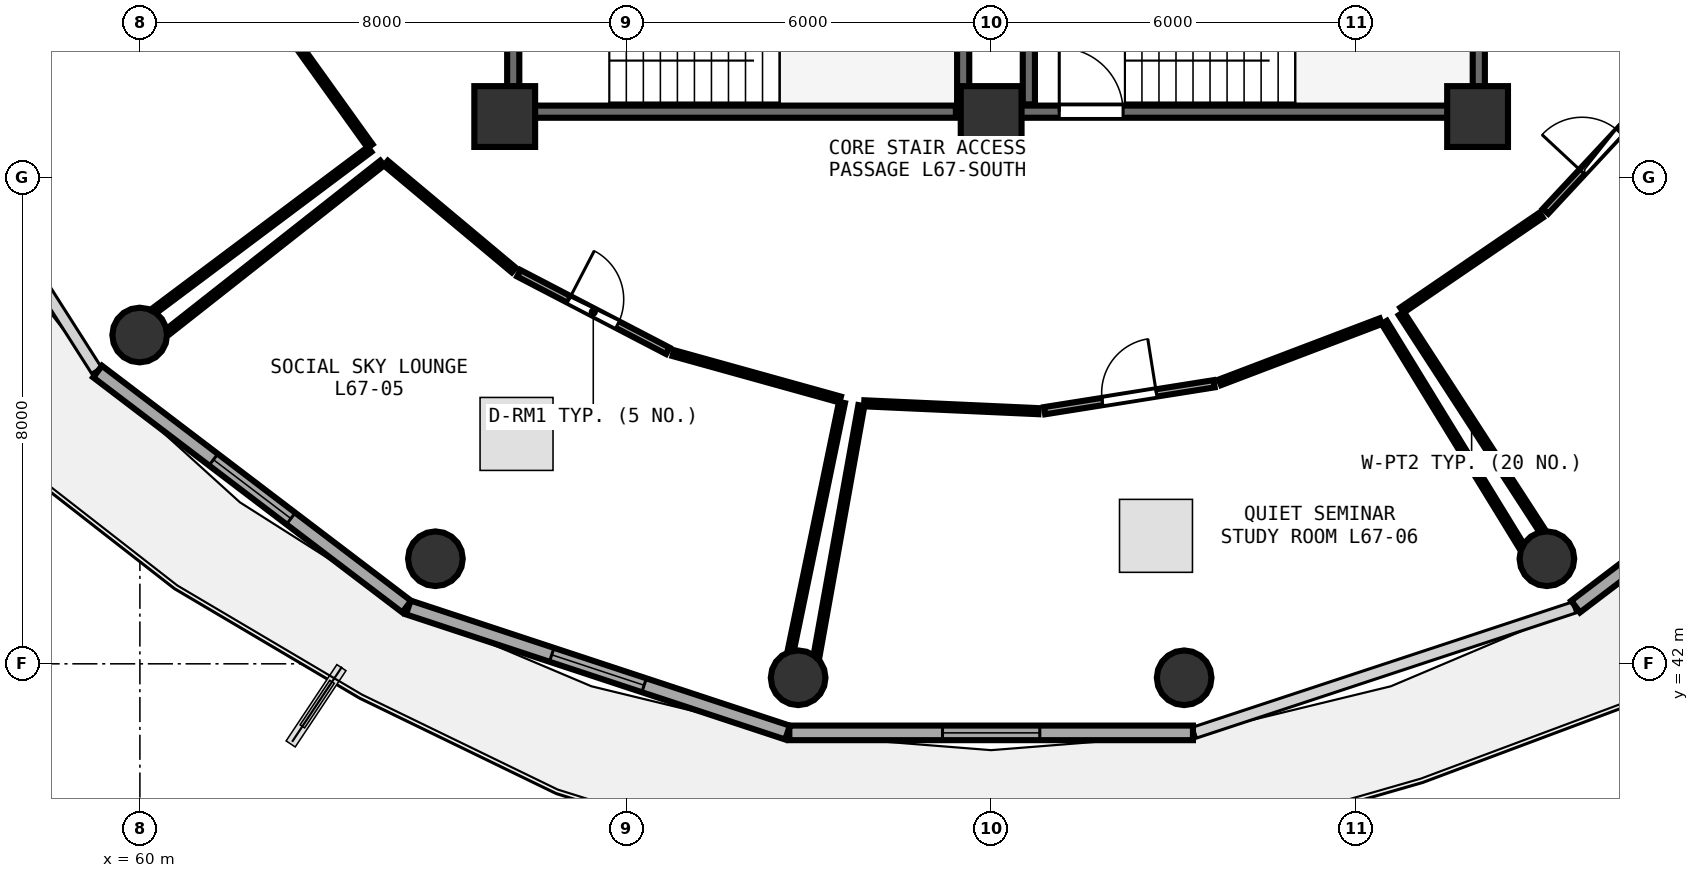
"""IFC4 building model, lengths in metres.
Left out: names, types, materials, properties, quantities, classifications, styles, units other than length and angle.
Written with IfcOpenShell. Run it as: python <this file> out.ifc"""

import sys

from ifc_helpers import new_model, si_unit, direction, frame, frame_2d, origin, origin_2d, place, context, subcontext, project, spatial, rectangle, circle, extrude, element, fill, save


model = new_model("IFC4")
c1 = context("Model", 3, precision=1e-05, world=origin(), true_north=direction((0.0, 1.0)))
c2 = subcontext(c1, "Body", "Model", "MODEL_VIEW")
j1 = project(units=[si_unit("LENGTHUNIT", "METRE"), si_unit("PLANEANGLEUNIT", "RADIAN")], contexts=[c1])
p1 = place(None, origin())
s1 = spatial("IfcSite", under=j1, at=p1, CompositionType="ELEMENT")
p2 = place(p1, origin())
s2 = spatial("IfcBuilding", under=s1, at=p2, CompositionType="ELEMENT")
p3 = place(p2, frame((0.0, 0.0, 263.7)))
s3 = spatial("IfcBuildingStorey", under=s2, at=p3, CompositionType="ELEMENT", Elevation=263.7)
for number, where, z_axis, x_axis in (
    (1, (66.0, 51.0, 0.0), (0.0, 0.0, 1.0), (1.0, 0.0, 0.0)),
    (2, (74.0, 51.0, 0.0), (0.0, 0.0, 1.0), (1.0, 0.0, 0.0)),
    (3, (82.0, 51.0, 0.0), (0.0, 0.0, 1.0), (1.0, 0.0, 0.0)),
):
    element("IfcColumn", number, at=place(p3, frame(where, z_axis=z_axis, x_axis=x_axis)), inside=s3, PredefinedType="PILASTER", context=c2, shape_type="SweptSolid", body=[
        extrude(rectangle(XDim=1.0, YDim=1.0, at=origin_2d()), origin(), (0.0, 0.0, 1.0), 3.75),
    ])
for number, where, z_axis, x_axis in (
    (4, (59.997, 47.407, 0.0), (0.0, 0.0, 1.0), (1.0, 0.0, 0.0)),
    (5, (64.86, 43.728, 0.0), (0.0, 0.0, 1.0), (1.0, 0.0, 0.0)),
    (6, (70.826, 41.771, 0.0), (0.0, 0.0, 1.0), (1.0, 0.0, 0.0)),
    (7, (77.174, 41.771, 0.0), (0.0, 0.0, 1.0), (1.0, 0.0, 0.0)),
    (8, (83.14, 43.728, 0.0), (0.0, 0.0, 1.0), (1.0, 0.0, 0.0)),
):
    element("IfcColumn", number, at=place(p3, frame(where, z_axis=z_axis, x_axis=x_axis)), inside=s3, PredefinedType="COLUMN", context=c2, shape_type="SweptSolid", body=[
        extrude(circle(Radius=0.45, at=origin_2d()), origin(), (0.0, 0.0, 1.0), 3.75),
    ])
p4 = place(p3, frame((59.304, 46.806, 0.0), z_axis=(0.0, 0.0, 1.0), x_axis=(0.796010444211, -0.605282886514, 0.0)))
e9 = element("IfcWall", 9, at=p4, inside=s3, PredefinedType="SOLIDWALL", context=c2, shape_type="SweptSolid", body=[
    extrude(rectangle(XDim=6.387, YDim=0.24, at=frame_2d((3.194, 0.0))), origin(), (0.0, 0.0, 1.0), 3.475),
])
p5 = place(p4, frame((2.394, 0.0, 0.85)))
e10 = element("IfcOpeningElement", 10, at=p5, cuts=e9, PredefinedType="OPENING", context=c2, shape_type="SweptSolid", body=[
    extrude(rectangle(XDim=1.6, YDim=1.45, at=frame_2d((0.8, 0.725))), frame((0.0, 0.13, 0.0), z_axis=(0.0, -1.0, 0.0), x_axis=(1.0, 0.0, 0.0)), (0.0, 0.0, 1.0), 0.26),
])
p6 = place(p3, frame((64.414, 42.927, 0.0), z_axis=(0.0, 0.0, 1.0), x_axis=(0.949663708393, -0.313271193954, 0.0)))
e11 = element("IfcWall", 11, at=p6, inside=s3, PredefinedType="SOLIDWALL", context=c2, shape_type="SweptSolid", body=[
    extrude(rectangle(XDim=6.568, YDim=0.24, at=frame_2d((3.284, 0.0))), origin(), (0.0, 0.0, 1.0), 3.475),
])
p7 = place(p6, frame((2.484, 0.0, 0.85)))
e12 = element("IfcOpeningElement", 12, at=p7, cuts=e11, PredefinedType="OPENING", context=c2, shape_type="SweptSolid", body=[
    extrude(rectangle(XDim=1.6, YDim=1.45, at=frame_2d((0.8, 0.725))), frame((0.0, 0.13, 0.0), z_axis=(0.0, -1.0, 0.0), x_axis=(1.0, 0.0, 0.0)), (0.0, 0.0, 1.0), 0.26),
])
p8 = place(p3, frame((70.681, 40.864, 0.0), z_axis=(0.0, 0.0, 1.0), x_axis=(1.0, 0.0, 0.0)))
e13 = element("IfcWall", 13, at=p8, inside=s3, PredefinedType="SOLIDWALL", context=c2, shape_type="SweptSolid", body=[
    extrude(rectangle(XDim=6.638, YDim=0.24, at=frame_2d((3.319, 0.0))), origin(), (0.0, 0.0, 1.0), 3.475),
])
p9 = place(p8, frame((2.519, 0.0, 0.85)))
e14 = element("IfcOpeningElement", 14, at=p9, cuts=e13, PredefinedType="OPENING", context=c2, shape_type="SweptSolid", body=[
    extrude(rectangle(XDim=1.6, YDim=1.45, at=frame_2d((0.8, 0.725))), frame((0.0, 0.13, 0.0), z_axis=(0.0, -1.0, 0.0), x_axis=(1.0, 0.0, 0.0)), (0.0, 0.0, 1.0), 0.26),
])
p10 = place(p3, frame((83.612, 42.94, 0.0), z_axis=(0.0, 0.0, 1.0), x_axis=(0.796010444211, 0.605282886514, 0.0)))
e15 = element("IfcWall", 15, at=p10, inside=s3, PredefinedType="SOLIDWALL", context=c2, shape_type="SweptSolid", body=[
    extrude(rectangle(XDim=6.387, YDim=0.24, at=frame_2d((3.194, 0.0))), origin(), (0.0, 0.0, 1.0), 3.475),
])
p11 = place(p10, frame((2.394, 0.0, 0.85)))
e16 = element("IfcOpeningElement", 16, at=p11, cuts=e15, PredefinedType="OPENING", context=c2, shape_type="SweptSolid", body=[
    extrude(rectangle(XDim=1.6, YDim=1.45, at=frame_2d((0.8, 0.725))), frame((0.0, 0.13, 0.0), z_axis=(0.0, -1.0, 0.0), x_axis=(1.0, 0.0, 0.0)), (0.0, 0.0, 1.0), 0.26),
])
p12 = place(p3, frame((74.0, 51.08, 0.0), z_axis=(0.0, 0.0, 1.0), x_axis=(1.0, 0.0, 0.0)))
e17 = element("IfcWall", 17, at=p12, inside=s3, PredefinedType="SHEAR", context=c2, shape_type="SweptSolid", body=[
    extrude(rectangle(XDim=7.9, YDim=0.2, at=frame_2d((3.95, 0.0))), origin(), (0.0, 0.0, 1.0), 3.49),
])
p13 = place(p12, frame((1.12, 0.0, 0.0)))
e18 = element("IfcOpeningElement", 18, at=p13, cuts=e17, PredefinedType="OPENING", context=c2, shape_type="SweptSolid", body=[
    extrude(rectangle(XDim=1.05, YDim=2.1, at=frame_2d((0.525, 1.05))), frame((0.0, 0.11, 0.0), z_axis=(0.0, -1.0, 0.0), x_axis=(1.0, 0.0, 0.0)), (0.0, 0.0, 1.0), 0.22),
])
for number, where, z_axis, x_axis in (
    (19, (82.02, 51.2, 0.0), (0.0, 0.0, 1.0), (0.0, 1.0, 0.0)),
    (20, (74.62, 54.27, 0.0), (0.0, 0.0, 1.0), (0.0, -1.0, 0.0)),
):
    element("IfcWall", number, at=place(p3, frame(where, z_axis=z_axis, x_axis=x_axis)), inside=s3, PredefinedType="SHEAR", context=c2, shape_type="SweptSolid", body=[
        extrude(rectangle(XDim=3.07, YDim=0.2, at=frame_2d((1.535, 0.0))), origin(), (0.0, 0.0, 1.0), 3.49),
    ])
p14 = place(p3, frame((66.26, 51.08, 0.0), z_axis=(0.0, 0.0, 1.0), x_axis=(1.0, 0.0, 0.0)))
e21 = element("IfcWall", 21, at=p14, inside=s3, PredefinedType="SHEAR", context=c2, shape_type="SweptSolid", body=[
    extrude(rectangle(XDim=7.16, YDim=0.2, at=frame_2d((3.58, 0.0))), origin(), (0.0, 0.0, 1.0), 3.49),
])
p15 = place(p3, frame((73.54, 51.2, 0.0), z_axis=(0.0, 0.0, 1.0), x_axis=(0.0, 1.0, 0.0)))
e22 = element("IfcWall", 22, at=p15, inside=s3, PredefinedType="SHEAR", context=c2, shape_type="SweptSolid", body=[
    extrude(rectangle(XDim=3.07, YDim=0.2, at=frame_2d((1.535, 0.0))), origin(), (0.0, 0.0, 1.0), 3.49),
])
p16 = place(p3, frame((66.14, 54.27, 0.0), z_axis=(0.0, 0.0, 1.0), x_axis=(0.0, -1.0, 0.0)))
e23 = element("IfcWall", 23, at=p16, inside=s3, PredefinedType="SHEAR", context=c2, shape_type="SweptSolid", body=[
    extrude(rectangle(XDim=3.07, YDim=0.2, at=frame_2d((1.535, 0.0))), origin(), (0.0, 0.0, 1.0), 3.49),
])
p17 = place(p16, frame((1.01, 0.0, 0.0)))
e24 = element("IfcOpeningElement", 24, at=p17, cuts=e23, PredefinedType="OPENING", context=c2, shape_type="SweptSolid", body=[
    extrude(rectangle(XDim=1.05, YDim=2.1, at=frame_2d((0.525, 1.05))), frame((0.0, 0.11, 0.0), z_axis=(0.0, -1.0, 0.0), x_axis=(1.0, 0.0, 0.0)), (0.0, 0.0, 1.0), 0.22),
])
p18 = place(p3, frame((66.232, 48.422, 0.0), z_axis=(0.0, 0.0, 1.0), x_axis=(0.887021247279, -0.461728607382, 0.0)))
e25 = element("IfcWall", 25, at=p18, inside=s3, PredefinedType="PARTITIONING", context=c2, shape_type="SweptSolid", body=[
    extrude(rectangle(XDim=2.761, YDim=0.12, at=frame_2d((1.38, 0.0))), origin(), (0.0, 0.0, 1.0), 3.235),
])
p19 = place(p18, frame((0.93, 0.0, 0.0)))
e26 = element("IfcOpeningElement", 26, at=p19, cuts=e25, PredefinedType="OPENING", context=c2, shape_type="SweptSolid", body=[
    extrude(rectangle(XDim=0.9, YDim=2.08, at=frame_2d((0.45, 1.04))), frame((0.0, 0.07, 0.0), z_axis=(0.0, -1.0, 0.0), x_axis=(1.0, 0.0, 0.0)), (0.0, 0.0, 1.0), 0.14),
])
p20 = place(p3, frame((74.878, 46.162, 0.0), z_axis=(0.0, 0.0, 1.0), x_axis=(0.987593415231, 0.157032627796, 0.0)))
e27 = element("IfcWall", 27, at=p20, inside=s3, PredefinedType="PARTITIONING", context=c2, shape_type="SweptSolid", body=[
    extrude(rectangle(XDim=2.823, YDim=0.12, at=frame_2d((1.412, 0.0))), origin(), (0.0, 0.0, 1.0), 3.075),
])
p21 = place(p20, frame((0.962, 0.0, 0.0)))
e28 = element("IfcOpeningElement", 28, at=p21, cuts=e27, PredefinedType="OPENING", context=c2, shape_type="SweptSolid", body=[
    extrude(rectangle(XDim=0.9, YDim=2.08, at=frame_2d((0.45, 1.04))), frame((0.0, 0.07, 0.0), z_axis=(0.0, -1.0, 0.0), x_axis=(1.0, 0.0, 0.0)), (0.0, 0.0, 1.0), 0.14),
])
p22 = place(p3, frame((83.118, 49.443, 0.0), z_axis=(0.0, 0.0, 1.0), x_axis=(0.681315269885, 0.731990097625, 0.0)))
e29 = element("IfcWall", 29, at=p22, inside=s3, PredefinedType="PARTITIONING", context=c2, shape_type="SweptSolid", body=[
    extrude(rectangle(XDim=2.664, YDim=0.12, at=frame_2d((1.332, 0.0))), origin(), (0.0, 0.0, 1.0), 3.075),
])
p23 = place(p22, frame((0.882, 0.0, 0.0)))
e30 = element("IfcOpeningElement", 30, at=p23, cuts=e29, PredefinedType="OPENING", context=c2, shape_type="SweptSolid", body=[
    extrude(rectangle(XDim=0.9, YDim=2.08, at=frame_2d((0.45, 1.04))), frame((0.0, 0.07, 0.0), z_axis=(0.0, -1.0, 0.0), x_axis=(1.0, 0.0, 0.0)), (0.0, 0.0, 1.0), 0.14),
])
p24 = place(p3, frame((62.23, 52.684, 0.0), z_axis=(0.0, 0.0, 1.0), x_axis=(0.582725386778, -0.812669135383, 0.0)))
e31 = element("IfcWall", 31, at=p24, inside=s3, PredefinedType="PARTITIONING", context=c2, shape_type="SweptSolid", body=[
    extrude(rectangle(XDim=2.669, YDim=0.1, at=frame_2d((1.334, 0.0))), origin(), (0.0, 0.0, 1.0), 3.075),
])
p25 = place(p3, frame((63.777, 50.458, 0.0), z_axis=(0.0, 0.0, 1.0), x_axis=(-0.800384816546, -0.599486568191, 0.0)))
e32 = element("IfcWall", 32, at=p25, inside=s3, PredefinedType="PARTITIONING", context=c2, shape_type="SweptSolid", body=[
    extrude(rectangle(XDim=4.414, YDim=0.1, at=frame_2d((2.207, 0.0))), origin(), (0.0, 0.0, 1.0), 3.175),
])
p26 = place(p3, frame((64.046, 50.234, 0.0), z_axis=(0.0, 0.0, 1.0), x_axis=(0.767022676895, -0.641619991216, 0.0)))
e33 = element("IfcWall", 33, at=p26, inside=s3, PredefinedType="PARTITIONING", context=c2, shape_type="SweptSolid", body=[
    extrude(rectangle(XDim=2.741, YDim=0.1, at=frame_2d((1.371, 0.0))), origin(), (0.0, 0.0, 1.0), 3.075),
])
p27 = place(p3, frame((68.772, 47.109, 0.0), z_axis=(0.0, 0.0, 1.0), x_axis=(0.963478601256, -0.267785333659, 0.0)))
e34 = element("IfcWall", 34, at=p27, inside=s3, PredefinedType="PARTITIONING", context=c2, shape_type="SweptSolid", body=[
    extrude(rectangle(XDim=2.848, YDim=0.1, at=frame_2d((1.424, 0.0))), origin(), (0.0, 0.0, 1.0), 3.48),
])
p28 = place(p3, frame((71.547, 46.297, 0.0), z_axis=(0.0, 0.0, 1.0), x_axis=(-0.202308141573, -0.979321916355, 0.0)))
e35 = element("IfcWall", 35, at=p28, inside=s3, PredefinedType="PARTITIONING", context=c2, shape_type="SweptSolid", body=[
    extrude(rectangle(XDim=4.153, YDim=0.1, at=frame_2d((2.076, 0.0))), origin(), (0.0, 0.0, 1.0), 3.175),
])
p29 = place(p3, frame((60.468, 47.468, 0.0), z_axis=(0.0, 0.0, 1.0), x_axis=(0.785736749878, 0.618561039745, 0.0)))
e36 = element("IfcWall", 36, at=p29, inside=s3, PredefinedType="PARTITIONING", context=c2, shape_type="SweptSolid", body=[
    extrude(rectangle(XDim=4.475, YDim=0.1, at=frame_2d((2.237, 0.0))), origin(), (0.0, 0.0, 1.0), 3.075),
])
p30 = place(p3, frame((71.912, 46.284, 0.0), z_axis=(0.0, 0.0, 1.0), x_axis=(0.998983047325, -0.045087372484, 0.0)))
e37 = element("IfcWall", 37, at=p30, inside=s3, PredefinedType="PARTITIONING", context=c2, shape_type="SweptSolid", body=[
    extrude(rectangle(XDim=2.87, YDim=0.1, at=frame_2d((1.435, 0.0))), origin(), (0.0, 0.0, 1.0), 3.075),
])
p31 = place(p3, frame((77.763, 46.629, 0.0), z_axis=(0.0, 0.0, 1.0), x_axis=(0.934691278896, 0.355460564839, 0.0)))
e38 = element("IfcWall", 38, at=p31, inside=s3, PredefinedType="PARTITIONING", context=c2, shape_type="SweptSolid", body=[
    extrude(rectangle(XDim=2.829, YDim=0.1, at=frame_2d((1.415, 0.0))), origin(), (0.0, 0.0, 1.0), 3.48),
])
p32 = place(p3, frame((80.466, 47.615, 0.0), z_axis=(0.0, 0.0, 1.0), x_axis=(0.522784059663, -0.852465147066, 0.0)))
e39 = element("IfcWall", 39, at=p32, inside=s3, PredefinedType="PARTITIONING", context=c2, shape_type="SweptSolid", body=[
    extrude(rectangle(XDim=4.306, YDim=0.1, at=frame_2d((2.153, 0.0))), origin(), (0.0, 0.0, 1.0), 3.175),
])
p33 = place(p3, frame((71.129, 42.136, 0.0), z_axis=(0.0, 0.0, 1.0), x_axis=(0.176199339585, 0.984354505618, 0.0)))
e40 = element("IfcWall", 40, at=p33, inside=s3, PredefinedType="PARTITIONING", context=c2, shape_type="SweptSolid", body=[
    extrude(rectangle(XDim=4.176, YDim=0.1, at=frame_2d((2.088, 0.0))), origin(), (0.0, 0.0, 1.0), 3.075),
])
p34 = place(p3, frame((80.757, 47.816, 0.0), z_axis=(0.0, 0.0, 1.0), x_axis=(0.826087380575, 0.563542047814, 0.0)))
e41 = element("IfcWall", 41, at=p34, inside=s3, PredefinedType="PARTITIONING", context=c2, shape_type="SweptSolid", body=[
    extrude(rectangle(XDim=2.768, YDim=0.1, at=frame_2d((1.384, 0.0))), origin(), (0.0, 0.0, 1.0), 3.075),
])
p35 = place(p3, frame((83.058, 44.196, 0.0), z_axis=(0.0, 0.0, 1.0), x_axis=(-0.544234825024, 0.838932926539, 0.0)))
e42 = element("IfcWall", 42, at=p35, inside=s3, PredefinedType="PARTITIONING", context=c2, shape_type="SweptSolid", body=[
    extrude(rectangle(XDim=4.249, YDim=0.1, at=frame_2d((2.125, 0.0))), origin(), (0.0, 0.0, 1.0), 3.075),
])
p36 = place(p5, origin())
e43 = element("IfcWindow", 43, at=p36, inside=s3, PartitioningType="SINGLE_PANEL", PredefinedType="WINDOW", context=c2, shape_type="SweptSolid", body=[
    extrude(rectangle(XDim=1.6, YDim=1.45, at=frame_2d((0.8, 0.725))), frame((0.0, 0.03, 0.0), z_axis=(0.0, -1.0, 0.0), x_axis=(1.0, 0.0, 0.0)), (0.0, 0.0, 1.0), 0.06),
])
fill(e10, e43)
p37 = place(p7, origin())
e44 = element("IfcWindow", 44, at=p37, inside=s3, PartitioningType="SINGLE_PANEL", PredefinedType="WINDOW", context=c2, shape_type="SweptSolid", body=[
    extrude(rectangle(XDim=1.6, YDim=1.45, at=frame_2d((0.8, 0.725))), frame((0.0, 0.03, 0.0), z_axis=(0.0, -1.0, 0.0), x_axis=(1.0, 0.0, 0.0)), (0.0, 0.0, 1.0), 0.06),
])
fill(e12, e44)
p38 = place(p9, origin())
e45 = element("IfcWindow", 45, at=p38, inside=s3, PartitioningType="SINGLE_PANEL", PredefinedType="WINDOW", context=c2, shape_type="SweptSolid", body=[
    extrude(rectangle(XDim=1.6, YDim=1.45, at=frame_2d((0.8, 0.725))), frame((0.0, 0.03, 0.0), z_axis=(0.0, -1.0, 0.0), x_axis=(1.0, 0.0, 0.0)), (0.0, 0.0, 1.0), 0.06),
])
fill(e14, e45)
p39 = place(p13, origin())
e46 = element("IfcDoor", 46, at=p39, inside=s3, OperationType="SINGLE_SWING_LEFT", PredefinedType="DOOR", context=c2, shape_type="SweptSolid", body=[
    extrude(rectangle(XDim=1.05, YDim=2.1, at=frame_2d((0.525, 1.05))), frame((0.0, 0.025, 0.0), z_axis=(0.0, -1.0, 0.0), x_axis=(1.0, 0.0, 0.0)), (0.0, 0.0, 1.0), 0.05),
])
fill(e18, e46)
p40 = place(p19, origin())
e47 = element("IfcDoor", 47, at=p40, inside=s3, OperationType="SINGLE_SWING_LEFT", PredefinedType="DOOR", context=c2, shape_type="SweptSolid", body=[
    extrude(rectangle(XDim=0.9, YDim=2.08, at=frame_2d((0.45, 1.04))), frame((0.0, 0.025, 0.0), z_axis=(0.0, -1.0, 0.0), x_axis=(1.0, 0.0, 0.0)), (0.0, 0.0, 1.0), 0.05),
])
fill(e26, e47)
p41 = place(p21, origin())
e48 = element("IfcDoor", 48, at=p41, inside=s3, OperationType="SINGLE_SWING_RIGHT", PredefinedType="DOOR", context=c2, shape_type="SweptSolid", body=[
    extrude(rectangle(XDim=0.9, YDim=2.08, at=frame_2d((0.45, 1.04))), frame((0.0, 0.025, 0.0), z_axis=(0.0, -1.0, 0.0), x_axis=(1.0, 0.0, 0.0)), (0.0, 0.0, 1.0), 0.05),
])
fill(e28, e48)
p42 = place(p23, origin())
e49 = element("IfcDoor", 49, at=p42, inside=s3, OperationType="SINGLE_SWING_LEFT", PredefinedType="DOOR", context=c2, shape_type="SweptSolid", body=[
    extrude(rectangle(XDim=0.9, YDim=2.08, at=frame_2d((0.45, 1.04))), frame((0.0, 0.025, 0.0), z_axis=(0.0, -1.0, 0.0), x_axis=(1.0, 0.0, 0.0)), (0.0, 0.0, 1.0), 0.05),
])
fill(e30, e49)
save(model, sys.argv[1])
